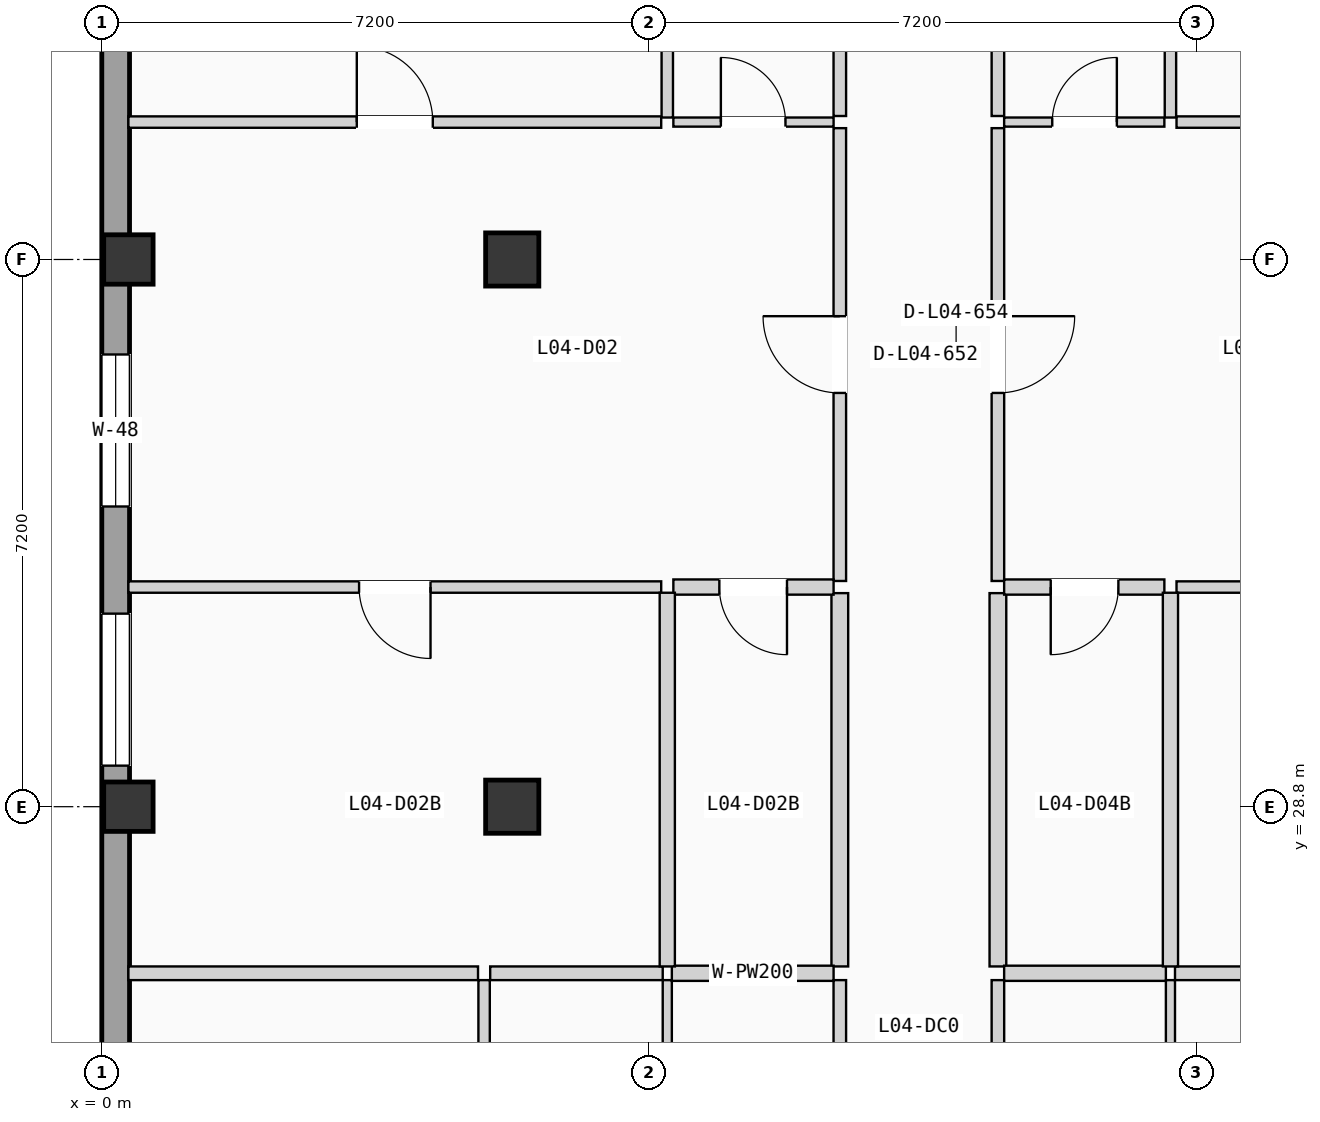
"""IFC4 building model, lengths in metres.
Left out: names, types, materials, properties, quantities, classifications, styles, units other than length and angle.
Written with IfcOpenShell. Run it as: python <this file> out.ifc"""

import sys

from ifc_helpers import new_model, si_unit, direction, frame, frame_2d, origin, origin_2d, place, context, subcontext, project, spatial, rectangle, extrude, element, fill, save


model = new_model("IFC4")
c1 = context("Model", 3, precision=1e-05, world=origin(), true_north=direction((0.0, 1.0)))
c2 = subcontext(c1, "Body", "Model", "MODEL_VIEW")
j1 = project(units=[si_unit("LENGTHUNIT", "METRE"), si_unit("PLANEANGLEUNIT", "RADIAN")], contexts=[c1])
p1 = place(None, origin())
s1 = spatial("IfcSite", under=j1, at=p1, CompositionType="ELEMENT")
p2 = place(p1, origin())
s2 = spatial("IfcBuilding", under=s1, at=p2, CompositionType="ELEMENT")
p3 = place(p2, frame((0.0, 0.0, 15.225)))
s3 = spatial("IfcBuildingStorey", under=s2, at=p3, CompositionType="ELEMENT", Elevation=15.225)
for number, where, z_axis, x_axis in (
    (1, (0.35, 28.8, 0.0), (0.0, 0.0, 1.0), (1.0, 0.0, 0.0)),
    (2, (0.35, 36.0, 0.0), (0.0, 0.0, 1.0), (1.0, 0.0, 0.0)),
):
    element("IfcColumn", number, at=place(p3, frame(where, z_axis=z_axis, x_axis=x_axis)), inside=s3, PredefinedType="COLUMN", context=c2, shape_type="SweptSolid", body=[
        extrude(rectangle(XDim=0.65, YDim=0.65, at=origin_2d()), origin(), (0.0, 0.0, 1.0), 3.15),
    ])
for number, where, z_axis, x_axis in (
    (3, (5.4, 28.8, 0.0), (0.0, 0.0, 1.0), (1.0, 0.0, 0.0)),
    (4, (5.4, 36.0, 0.0), (0.0, 0.0, 1.0), (1.0, 0.0, 0.0)),
):
    element("IfcColumn", number, at=place(p3, frame(where, z_axis=z_axis, x_axis=x_axis)), inside=s3, PredefinedType="COLUMN", context=c2, shape_type="SweptSolid", body=[
        extrude(rectangle(XDim=0.7, YDim=0.7, at=origin_2d()), origin(), (0.0, 0.0, 1.0), 3.15),
    ])
p4 = place(p3, frame((0.183, 0.365, 0.0), z_axis=(0.0, 0.0, 1.0), x_axis=(0.0, 1.0, 0.0)))
e5 = element("IfcWall", 5, at=p4, inside=s3, PredefinedType="SOLIDWALL", context=c2, shape_type="SweptSolid", body=[
    extrude(rectangle(XDim=49.67, YDim=0.365, at=frame_2d((24.835, 0.0))), origin(), (0.0, 0.0, 1.0), 2.89),
])
p5 = place(p4, frame((16.782, 0.0, 0.85)))
e6 = element("IfcOpeningElement", 6, at=p5, cuts=e5, PredefinedType="OPENING", context=c2, shape_type="SweptSolid", body=[
    extrude(rectangle(XDim=0.95, YDim=1.2, at=frame_2d((0.475, 0.6))), frame((0.0, 0.192, 0.0), z_axis=(0.0, -1.0, 0.0), x_axis=(1.0, 0.0, 0.0)), (0.0, 0.0, 1.0), 0.385),
])
p6 = place(p4, frame((9.127, 0.0, 0.9)))
e7 = element("IfcOpeningElement", 7, at=p6, cuts=e5, PredefinedType="OPENING", context=c2, shape_type="SweptSolid", body=[
    extrude(rectangle(XDim=2.0, YDim=1.2, at=frame_2d((1.0, 0.6))), frame((0.0, 0.192, 0.0), z_axis=(0.0, -1.0, 0.0), x_axis=(1.0, 0.0, 0.0)), (0.0, 0.0, 1.0), 0.385),
])
p7 = place(p4, frame((22.829, 0.0, 0.855)))
e8 = element("IfcOpeningElement", 8, at=p7, cuts=e5, PredefinedType="OPENING", context=c2, shape_type="SweptSolid", body=[
    extrude(rectangle(XDim=2.0, YDim=1.35, at=frame_2d((1.0, 0.675))), frame((0.0, 0.192, 0.0), z_axis=(0.0, -1.0, 0.0), x_axis=(1.0, 0.0, 0.0)), (0.0, 0.0, 1.0), 0.385),
])
p8 = place(p4, frame((32.385, 0.0, 0.705)))
e9 = element("IfcOpeningElement", 9, at=p8, cuts=e5, PredefinedType="OPENING", context=c2, shape_type="SweptSolid", body=[
    extrude(rectangle(XDim=2.0, YDim=1.5, at=frame_2d((1.0, 0.75))), frame((0.0, 0.192, 0.0), z_axis=(0.0, -1.0, 0.0), x_axis=(1.0, 0.0, 0.0)), (0.0, 0.0, 1.0), 0.385),
])
p9 = place(p4, frame((28.975, 0.0, 0.555)))
e10 = element("IfcOpeningElement", 10, at=p9, cuts=e5, PredefinedType="OPENING", context=c2, shape_type="SweptSolid", body=[
    extrude(rectangle(XDim=2.0, YDim=1.65, at=frame_2d((1.0, 0.825))), frame((0.0, 0.192, 0.0), z_axis=(0.0, -1.0, 0.0), x_axis=(1.0, 0.0, 0.0)), (0.0, 0.0, 1.0), 0.385),
])
p10 = place(p4, frame((39.504, 0.0, 0.85)))
e11 = element("IfcOpeningElement", 11, at=p10, cuts=e5, PredefinedType="OPENING", context=c2, shape_type="SweptSolid", body=[
    extrude(rectangle(XDim=0.95, YDim=1.2, at=frame_2d((0.475, 0.6))), frame((0.0, 0.192, 0.0), z_axis=(0.0, -1.0, 0.0), x_axis=(1.0, 0.0, 0.0)), (0.0, 0.0, 1.0), 0.385),
])
p11 = place(p3, frame((9.71, 20.733, 0.0), z_axis=(0.0, 0.0, 1.0), x_axis=(0.0, 1.0, 0.0)))
e12 = element("IfcWall", 12, at=p11, inside=s3, PredefinedType="PARTITIONING", context=c2, shape_type="SweptSolid", body=[
    extrude(rectangle(XDim=5.785, YDim=0.165, at=frame_2d((2.893, 0.0))), origin(), (0.0, 0.0, 1.0), 2.87),
])
p12 = place(p3, frame((9.71, 31.77, 0.0), z_axis=(0.0, 0.0, 1.0), x_axis=(0.0, 1.0, 0.0)))
e13 = element("IfcWall", 13, at=p12, inside=s3, PredefinedType="PARTITIONING", context=c2, shape_type="SweptSolid", body=[
    extrude(rectangle(XDim=5.958, YDim=0.165, at=frame_2d((2.979, 0.0))), origin(), (0.0, 0.0, 1.0), 2.87),
])
p13 = place(p12, frame((2.474, 0.0, 0.0)))
e14 = element("IfcOpeningElement", 14, at=p13, cuts=e13, PredefinedType="OPENING", context=c2, shape_type="SweptSolid", body=[
    extrude(rectangle(XDim=1.01, YDim=2.11, at=frame_2d((0.505, 1.055))), frame((0.0, 0.093, 0.0), z_axis=(0.0, -1.0, 0.0), x_axis=(1.0, 0.0, 0.0)), (0.0, 0.0, 1.0), 0.185),
])
p14 = place(p3, frame((9.71, 26.698, 0.0), z_axis=(0.0, 0.0, 1.0), x_axis=(0.0, 1.0, 0.0)))
e15 = element("IfcWall", 15, at=p14, inside=s3, PredefinedType="PLUMBINGWALL", context=c2, shape_type="SweptSolid", body=[
    extrude(rectangle(XDim=4.912, YDim=0.22, at=frame_2d((2.456, 0.0))), origin(), (0.0, 0.0, 1.0), 2.87),
])
p15 = place(p3, frame((9.71, 37.888, 0.0), z_axis=(0.0, 0.0, 1.0), x_axis=(0.0, 1.0, 0.0)))
e16 = element("IfcWall", 16, at=p15, inside=s3, PredefinedType="PARTITIONING", context=c2, shape_type="SweptSolid", body=[
    extrude(rectangle(XDim=4.912, YDim=0.165, at=frame_2d((2.456, 0.0))), origin(), (0.0, 0.0, 1.0), 2.87),
])
p16 = place(p3, frame((11.79, 20.733, 0.0), z_axis=(0.0, 0.0, 1.0), x_axis=(0.0, 1.0, 0.0)))
e17 = element("IfcWall", 17, at=p16, inside=s3, PredefinedType="PARTITIONING", context=c2, shape_type="SweptSolid", body=[
    extrude(rectangle(XDim=5.785, YDim=0.165, at=frame_2d((2.893, 0.0))), origin(), (0.0, 0.0, 1.0), 2.87),
])
p17 = place(p3, frame((11.79, 31.77, 0.0), z_axis=(0.0, 0.0, 1.0), x_axis=(0.0, 1.0, 0.0)))
e18 = element("IfcWall", 18, at=p17, inside=s3, PredefinedType="PARTITIONING", context=c2, shape_type="SweptSolid", body=[
    extrude(rectangle(XDim=5.958, YDim=0.165, at=frame_2d((2.979, 0.0))), origin(), (0.0, 0.0, 1.0), 2.87),
])
p18 = place(p17, frame((2.474, 0.0, 0.0)))
e19 = element("IfcOpeningElement", 19, at=p18, cuts=e18, PredefinedType="OPENING", context=c2, shape_type="SweptSolid", body=[
    extrude(rectangle(XDim=1.01, YDim=2.11, at=frame_2d((0.505, 1.055))), frame((0.0, 0.093, 0.0), z_axis=(0.0, -1.0, 0.0), x_axis=(1.0, 0.0, 0.0)), (0.0, 0.0, 1.0), 0.185),
])
p19 = place(p3, frame((11.79, 26.698, 0.0), z_axis=(0.0, 0.0, 1.0), x_axis=(0.0, 1.0, 0.0)))
e20 = element("IfcWall", 20, at=p19, inside=s3, PredefinedType="PLUMBINGWALL", context=c2, shape_type="SweptSolid", body=[
    extrude(rectangle(XDim=4.912, YDim=0.22, at=frame_2d((2.456, 0.0))), origin(), (0.0, 0.0, 1.0), 2.87),
])
p20 = place(p3, frame((11.79, 37.888, 0.0), z_axis=(0.0, 0.0, 1.0), x_axis=(0.0, 1.0, 0.0)))
e21 = element("IfcWall", 21, at=p20, inside=s3, PredefinedType="PARTITIONING", context=c2, shape_type="SweptSolid", body=[
    extrude(rectangle(XDim=4.912, YDim=0.165, at=frame_2d((2.456, 0.0))), origin(), (0.0, 0.0, 1.0), 2.87),
])
p21 = place(p3, frame((7.44, 20.713, 0.0), z_axis=(0.0, 0.0, 1.0), x_axis=(0.0, 1.0, 0.0)))
e22 = element("IfcWall", 22, at=p21, inside=s3, PredefinedType="PARTITIONING", context=c2, shape_type="SweptSolid", body=[
    extrude(rectangle(XDim=5.805, YDim=0.12, at=frame_2d((2.903, 0.0))), origin(), (0.0, 0.0, 1.0), 2.87),
])
p22 = place(p3, frame((7.5, 26.608, 0.0), z_axis=(0.0, 0.0, 1.0), x_axis=(1.0, 0.0, 0.0)))
e23 = element("IfcWall", 23, at=p22, inside=s3, PredefinedType="PLUMBINGWALL", context=c2, shape_type="SweptSolid", body=[
    extrude(rectangle(XDim=2.128, YDim=0.2, at=frame_2d((1.064, 0.0))), origin(), (0.0, 0.0, 1.0), 2.87),
])
p23 = place(p3, frame((5.03, 20.728, 0.0), z_axis=(0.0, 0.0, 1.0), x_axis=(0.0, 1.0, 0.0)))
e24 = element("IfcWall", 24, at=p23, inside=s3, PredefinedType="PARTITIONING", context=c2, shape_type="SweptSolid", body=[
    extrude(rectangle(XDim=5.79, YDim=0.15, at=frame_2d((2.895, 0.0))), origin(), (0.0, 0.0, 1.0), 2.87),
])
p24 = place(p3, frame((0.35, 26.608, 0.0), z_axis=(0.0, 0.0, 1.0), x_axis=(1.0, 0.0, 0.0)))
e25 = element("IfcWall", 25, at=p24, inside=s3, PredefinedType="PARTITIONING", context=c2, shape_type="SweptSolid", body=[
    extrude(rectangle(XDim=4.6, YDim=0.18, at=frame_2d((2.3, 0.0))), origin(), (0.0, 0.0, 1.0), 2.87),
])
p25 = place(p3, frame((5.11, 26.608, 0.0), z_axis=(0.0, 0.0, 1.0), x_axis=(1.0, 0.0, 0.0)))
e26 = element("IfcWall", 26, at=p25, inside=s3, PredefinedType="PARTITIONING", context=c2, shape_type="SweptSolid", body=[
    extrude(rectangle(XDim=2.27, YDim=0.18, at=frame_2d((1.135, 0.0))), origin(), (0.0, 0.0, 1.0), 2.87),
])
p26 = place(p3, frame((7.52, 31.69, 0.0), z_axis=(0.0, 0.0, 1.0), x_axis=(1.0, 0.0, 0.0)))
e27 = element("IfcWall", 27, at=p26, inside=s3, PredefinedType="PLUMBINGWALL", context=c2, shape_type="SweptSolid", body=[
    extrude(rectangle(XDim=2.108, YDim=0.2, at=frame_2d((1.054, 0.0))), origin(), (0.0, 0.0, 1.0), 2.87),
])
p27 = place(p26, frame((0.605, 0.0, 0.0)))
e28 = element("IfcOpeningElement", 28, at=p27, cuts=e27, PredefinedType="OPENING", context=c2, shape_type="SweptSolid", body=[
    extrude(rectangle(XDim=0.89, YDim=2.03, at=frame_2d((0.445, 1.015))), frame((0.0, 0.11, 0.0), z_axis=(0.0, -1.0, 0.0), x_axis=(1.0, 0.0, 0.0)), (0.0, 0.0, 1.0), 0.22),
])
p28 = place(p3, frame((7.52, 37.808, 0.0), z_axis=(0.0, 0.0, 1.0), x_axis=(1.0, 0.0, 0.0)))
e29 = element("IfcWall", 29, at=p28, inside=s3, PredefinedType="PARTITIONING", context=c2, shape_type="SweptSolid", body=[
    extrude(rectangle(XDim=2.108, YDim=0.12, at=frame_2d((1.054, 0.0))), origin(), (0.0, 0.0, 1.0), 2.87),
])
p29 = place(p28, frame((0.625, 0.0, 0.0)))
e30 = element("IfcOpeningElement", 30, at=p29, cuts=e29, PredefinedType="OPENING", context=c2, shape_type="SweptSolid", body=[
    extrude(rectangle(XDim=0.85, YDim=2.01, at=frame_2d((0.425, 1.005))), frame((0.0, 0.07, 0.0), z_axis=(0.0, -1.0, 0.0), x_axis=(1.0, 0.0, 0.0)), (0.0, 0.0, 1.0), 0.14),
])
p30 = place(p3, frame((0.35, 31.69, 0.0), z_axis=(0.0, 0.0, 1.0), x_axis=(1.0, 0.0, 0.0)))
e31 = element("IfcWall", 31, at=p30, inside=s3, PredefinedType="PARTITIONING", context=c2, shape_type="SweptSolid", body=[
    extrude(rectangle(XDim=7.01, YDim=0.15, at=frame_2d((3.505, 0.0))), origin(), (0.0, 0.0, 1.0), 2.87),
])
p31 = place(p30, frame((3.035, 0.0, 0.0)))
e32 = element("IfcOpeningElement", 32, at=p31, cuts=e31, PredefinedType="OPENING", context=c2, shape_type="SweptSolid", body=[
    extrude(rectangle(XDim=0.94, YDim=2.06, at=frame_2d((0.47, 1.03))), frame((0.0, 0.085, 0.0), z_axis=(0.0, -1.0, 0.0), x_axis=(1.0, 0.0, 0.0)), (0.0, 0.0, 1.0), 0.17),
])
p32 = place(p3, frame((0.35, 37.808, 0.0), z_axis=(0.0, 0.0, 1.0), x_axis=(1.0, 0.0, 0.0)))
e33 = element("IfcWall", 33, at=p32, inside=s3, PredefinedType="PARTITIONING", context=c2, shape_type="SweptSolid", body=[
    extrude(rectangle(XDim=7.01, YDim=0.15, at=frame_2d((3.505, 0.0))), origin(), (0.0, 0.0, 1.0), 2.87),
])
p33 = place(p32, frame((3.005, 0.0, 0.0)))
e34 = element("IfcOpeningElement", 34, at=p33, cuts=e33, PredefinedType="OPENING", context=c2, shape_type="SweptSolid", body=[
    extrude(rectangle(XDim=1.0, YDim=2.06, at=frame_2d((0.5, 1.03))), frame((0.0, 0.085, 0.0), z_axis=(0.0, -1.0, 0.0), x_axis=(1.0, 0.0, 0.0)), (0.0, 0.0, 1.0), 0.17),
])
p34 = place(p3, frame((7.44, 26.698, 0.0), z_axis=(0.0, 0.0, 1.0), x_axis=(0.0, 1.0, 0.0)))
e35 = element("IfcWall", 35, at=p34, inside=s3, PredefinedType="PLUMBINGWALL", context=c2, shape_type="SweptSolid", body=[
    extrude(rectangle(XDim=4.917, YDim=0.2, at=frame_2d((2.458, 0.0))), origin(), (0.0, 0.0, 1.0), 2.87),
])
p35 = place(p3, frame((7.44, 37.868, 0.0), z_axis=(0.0, 0.0, 1.0), x_axis=(0.0, 1.0, 0.0)))
e36 = element("IfcWall", 36, at=p35, inside=s3, PredefinedType="PARTITIONING", context=c2, shape_type="SweptSolid", body=[
    extrude(rectangle(XDim=4.932, YDim=0.15, at=frame_2d((2.466, 0.0))), origin(), (0.0, 0.0, 1.0), 2.87),
])
p36 = place(p3, frame((14.06, 20.713, 0.0), z_axis=(0.0, 0.0, 1.0), x_axis=(0.0, 1.0, 0.0)))
e37 = element("IfcWall", 37, at=p36, inside=s3, PredefinedType="PARTITIONING", context=c2, shape_type="SweptSolid", body=[
    extrude(rectangle(XDim=5.805, YDim=0.12, at=frame_2d((2.903, 0.0))), origin(), (0.0, 0.0, 1.0), 2.87),
])
p37 = place(p3, frame((11.872, 26.608, 0.0), z_axis=(0.0, 0.0, 1.0), x_axis=(1.0, 0.0, 0.0)))
e38 = element("IfcWall", 38, at=p37, inside=s3, PredefinedType="PLUMBINGWALL", context=c2, shape_type="SweptSolid", body=[
    extrude(rectangle(XDim=2.128, YDim=0.2, at=frame_2d((1.064, 0.0))), origin(), (0.0, 0.0, 1.0), 2.87),
])
p38 = place(p3, frame((14.12, 26.608, 0.0), z_axis=(0.0, 0.0, 1.0), x_axis=(1.0, 0.0, 0.0)))
e39 = element("IfcWall", 39, at=p38, inside=s3, PredefinedType="PARTITIONING", context=c2, shape_type="SweptSolid", body=[
    extrude(rectangle(XDim=2.27, YDim=0.18, at=frame_2d((1.135, 0.0))), origin(), (0.0, 0.0, 1.0), 2.87),
])
p39 = place(p3, frame((11.872, 31.69, 0.0), z_axis=(0.0, 0.0, 1.0), x_axis=(1.0, 0.0, 0.0)))
e40 = element("IfcWall", 40, at=p39, inside=s3, PredefinedType="PLUMBINGWALL", context=c2, shape_type="SweptSolid", body=[
    extrude(rectangle(XDim=2.108, YDim=0.2, at=frame_2d((1.054, 0.0))), origin(), (0.0, 0.0, 1.0), 2.87),
])
p40 = place(p39, frame((0.613, 0.0, 0.0)))
e41 = element("IfcOpeningElement", 41, at=p40, cuts=e40, PredefinedType="OPENING", context=c2, shape_type="SweptSolid", body=[
    extrude(rectangle(XDim=0.89, YDim=2.03, at=frame_2d((0.445, 1.015))), frame((0.0, 0.11, 0.0), z_axis=(0.0, -1.0, 0.0), x_axis=(1.0, 0.0, 0.0)), (0.0, 0.0, 1.0), 0.22),
])
p41 = place(p3, frame((11.872, 37.808, 0.0), z_axis=(0.0, 0.0, 1.0), x_axis=(1.0, 0.0, 0.0)))
e42 = element("IfcWall", 42, at=p41, inside=s3, PredefinedType="PARTITIONING", context=c2, shape_type="SweptSolid", body=[
    extrude(rectangle(XDim=2.108, YDim=0.12, at=frame_2d((1.054, 0.0))), origin(), (0.0, 0.0, 1.0), 2.87),
])
p42 = place(p41, frame((0.633, 0.0, 0.0)))
e43 = element("IfcOpeningElement", 43, at=p42, cuts=e42, PredefinedType="OPENING", context=c2, shape_type="SweptSolid", body=[
    extrude(rectangle(XDim=0.85, YDim=2.01, at=frame_2d((0.425, 1.005))), frame((0.0, 0.07, 0.0), z_axis=(0.0, -1.0, 0.0), x_axis=(1.0, 0.0, 0.0)), (0.0, 0.0, 1.0), 0.14),
])
p43 = place(p3, frame((14.14, 31.69, 0.0), z_axis=(0.0, 0.0, 1.0), x_axis=(1.0, 0.0, 0.0)))
e44 = element("IfcWall", 44, at=p43, inside=s3, PredefinedType="PARTITIONING", context=c2, shape_type="SweptSolid", body=[
    extrude(rectangle(XDim=7.11, YDim=0.15, at=frame_2d((3.555, 0.0))), origin(), (0.0, 0.0, 1.0), 2.87),
])
p44 = place(p43, frame((3.105, 0.0, 0.0)))
e45 = element("IfcOpeningElement", 45, at=p44, cuts=e44, PredefinedType="OPENING", context=c2, shape_type="SweptSolid", body=[
    extrude(rectangle(XDim=0.9, YDim=2.04, at=frame_2d((0.45, 1.02))), frame((0.0, 0.085, 0.0), z_axis=(0.0, -1.0, 0.0), x_axis=(1.0, 0.0, 0.0)), (0.0, 0.0, 1.0), 0.17),
])
p45 = place(p3, frame((14.14, 37.808, 0.0), z_axis=(0.0, 0.0, 1.0), x_axis=(1.0, 0.0, 0.0)))
e46 = element("IfcWall", 46, at=p45, inside=s3, PredefinedType="PARTITIONING", context=c2, shape_type="SweptSolid", body=[
    extrude(rectangle(XDim=7.11, YDim=0.15, at=frame_2d((3.555, 0.0))), origin(), (0.0, 0.0, 1.0), 2.87),
])
p46 = place(p45, frame((3.085, 0.0, 0.0)))
e47 = element("IfcOpeningElement", 47, at=p46, cuts=e46, PredefinedType="OPENING", context=c2, shape_type="SweptSolid", body=[
    extrude(rectangle(XDim=0.94, YDim=2.06, at=frame_2d((0.47, 1.03))), frame((0.0, 0.085, 0.0), z_axis=(0.0, -1.0, 0.0), x_axis=(1.0, 0.0, 0.0)), (0.0, 0.0, 1.0), 0.17),
])
p47 = place(p3, frame((14.06, 26.698, 0.0), z_axis=(0.0, 0.0, 1.0), x_axis=(0.0, 1.0, 0.0)))
e48 = element("IfcWall", 48, at=p47, inside=s3, PredefinedType="PLUMBINGWALL", context=c2, shape_type="SweptSolid", body=[
    extrude(rectangle(XDim=4.917, YDim=0.2, at=frame_2d((2.458, 0.0))), origin(), (0.0, 0.0, 1.0), 2.87),
])
p48 = place(p3, frame((14.06, 37.868, 0.0), z_axis=(0.0, 0.0, 1.0), x_axis=(0.0, 1.0, 0.0)))
e49 = element("IfcWall", 49, at=p48, inside=s3, PredefinedType="PARTITIONING", context=c2, shape_type="SweptSolid", body=[
    extrude(rectangle(XDim=4.932, YDim=0.15, at=frame_2d((2.466, 0.0))), origin(), (0.0, 0.0, 1.0), 2.87),
])
p49 = place(p8, origin())
e50 = element("IfcWindow", 50, at=p49, inside=s3, PartitioningType="DOUBLE_PANEL_VERTICAL", PredefinedType="WINDOW", context=c2, shape_type="SweptSolid", body=[
    extrude(rectangle(XDim=2.0, YDim=1.5, at=frame_2d((1.0, 0.75))), frame((0.0, 0.03, 0.0), z_axis=(0.0, -1.0, 0.0), x_axis=(1.0, 0.0, 0.0)), (0.0, 0.0, 1.0), 0.06),
])
fill(e9, e50)
p50 = place(p9, origin())
e51 = element("IfcWindow", 51, at=p50, inside=s3, PartitioningType="DOUBLE_PANEL_VERTICAL", PredefinedType="WINDOW", context=c2, shape_type="SweptSolid", body=[
    extrude(rectangle(XDim=2.0, YDim=1.65, at=frame_2d((1.0, 0.825))), frame((0.0, 0.03, 0.0), z_axis=(0.0, -1.0, 0.0), x_axis=(1.0, 0.0, 0.0)), (0.0, 0.0, 1.0), 0.06),
])
fill(e10, e51)
p51 = place(p13, origin())
e52 = element("IfcDoor", 52, at=p51, inside=s3, OperationType="SINGLE_SWING_RIGHT", PredefinedType="DOOR", context=c2, shape_type="SweptSolid", body=[
    extrude(rectangle(XDim=1.01, YDim=2.11, at=frame_2d((0.505, 1.055))), frame((0.0, 0.025, 0.0), z_axis=(0.0, -1.0, 0.0), x_axis=(1.0, 0.0, 0.0)), (0.0, 0.0, 1.0), 0.05),
])
fill(e14, e52)
p52 = place(p18, frame((1.01, 0.0, 0.0), z_axis=(0.0, 0.0, 1.0), x_axis=(-1.0, 0.0, 0.0)))
e53 = element("IfcDoor", 53, at=p52, inside=s3, OperationType="SINGLE_SWING_RIGHT", PredefinedType="DOOR", context=c2, shape_type="SweptSolid", body=[
    extrude(rectangle(XDim=1.01, YDim=2.11, at=frame_2d((0.505, 1.055))), frame((0.0, 0.025, 0.0), z_axis=(0.0, -1.0, 0.0), x_axis=(1.0, 0.0, 0.0)), (0.0, 0.0, 1.0), 0.05),
])
fill(e19, e53)
p53 = place(p27, frame((0.89, 0.0, 0.0), z_axis=(0.0, 0.0, 1.0), x_axis=(-1.0, 0.0, 0.0)))
e54 = element("IfcDoor", 54, at=p53, inside=s3, OperationType="SINGLE_SWING_RIGHT", PredefinedType="DOOR", context=c2, shape_type="SweptSolid", body=[
    extrude(rectangle(XDim=0.89, YDim=2.03, at=frame_2d((0.445, 1.015))), frame((0.0, 0.025, 0.0), z_axis=(0.0, -1.0, 0.0), x_axis=(1.0, 0.0, 0.0)), (0.0, 0.0, 1.0), 0.05),
])
fill(e28, e54)
p54 = place(p29, origin())
e55 = element("IfcDoor", 55, at=p54, inside=s3, OperationType="SINGLE_SWING_LEFT", PredefinedType="DOOR", context=c2, shape_type="SweptSolid", body=[
    extrude(rectangle(XDim=0.85, YDim=2.01, at=frame_2d((0.425, 1.005))), frame((0.0, 0.025, 0.0), z_axis=(0.0, -1.0, 0.0), x_axis=(1.0, 0.0, 0.0)), (0.0, 0.0, 1.0), 0.05),
])
fill(e30, e55)
p55 = place(p31, frame((0.94, 0.0, 0.0), z_axis=(0.0, 0.0, 1.0), x_axis=(-1.0, 0.0, 0.0)))
e56 = element("IfcDoor", 56, at=p55, inside=s3, OperationType="SINGLE_SWING_RIGHT", PredefinedType="DOOR", context=c2, shape_type="SweptSolid", body=[
    extrude(rectangle(XDim=0.94, YDim=2.06, at=frame_2d((0.47, 1.03))), frame((0.0, 0.025, 0.0), z_axis=(0.0, -1.0, 0.0), x_axis=(1.0, 0.0, 0.0)), (0.0, 0.0, 1.0), 0.05),
])
fill(e32, e56)
p56 = place(p33, origin())
e57 = element("IfcDoor", 57, at=p56, inside=s3, OperationType="SINGLE_SWING_LEFT", PredefinedType="DOOR", context=c2, shape_type="SweptSolid", body=[
    extrude(rectangle(XDim=1.0, YDim=2.06, at=frame_2d((0.5, 1.03))), frame((0.0, 0.025, 0.0), z_axis=(0.0, -1.0, 0.0), x_axis=(1.0, 0.0, 0.0)), (0.0, 0.0, 1.0), 0.05),
])
fill(e34, e57)
p57 = place(p40, frame((0.89, 0.0, 0.0), z_axis=(0.0, 0.0, 1.0), x_axis=(-1.0, 0.0, 0.0)))
e58 = element("IfcDoor", 58, at=p57, inside=s3, OperationType="SINGLE_SWING_LEFT", PredefinedType="DOOR", context=c2, shape_type="SweptSolid", body=[
    extrude(rectangle(XDim=0.89, YDim=2.03, at=frame_2d((0.445, 1.015))), frame((0.0, 0.025, 0.0), z_axis=(0.0, -1.0, 0.0), x_axis=(1.0, 0.0, 0.0)), (0.0, 0.0, 1.0), 0.05),
])
fill(e41, e58)
p58 = place(p42, origin())
e59 = element("IfcDoor", 59, at=p58, inside=s3, OperationType="SINGLE_SWING_RIGHT", PredefinedType="DOOR", context=c2, shape_type="SweptSolid", body=[
    extrude(rectangle(XDim=0.85, YDim=2.01, at=frame_2d((0.425, 1.005))), frame((0.0, 0.025, 0.0), z_axis=(0.0, -1.0, 0.0), x_axis=(1.0, 0.0, 0.0)), (0.0, 0.0, 1.0), 0.05),
])
fill(e43, e59)
save(model, sys.argv[1])
